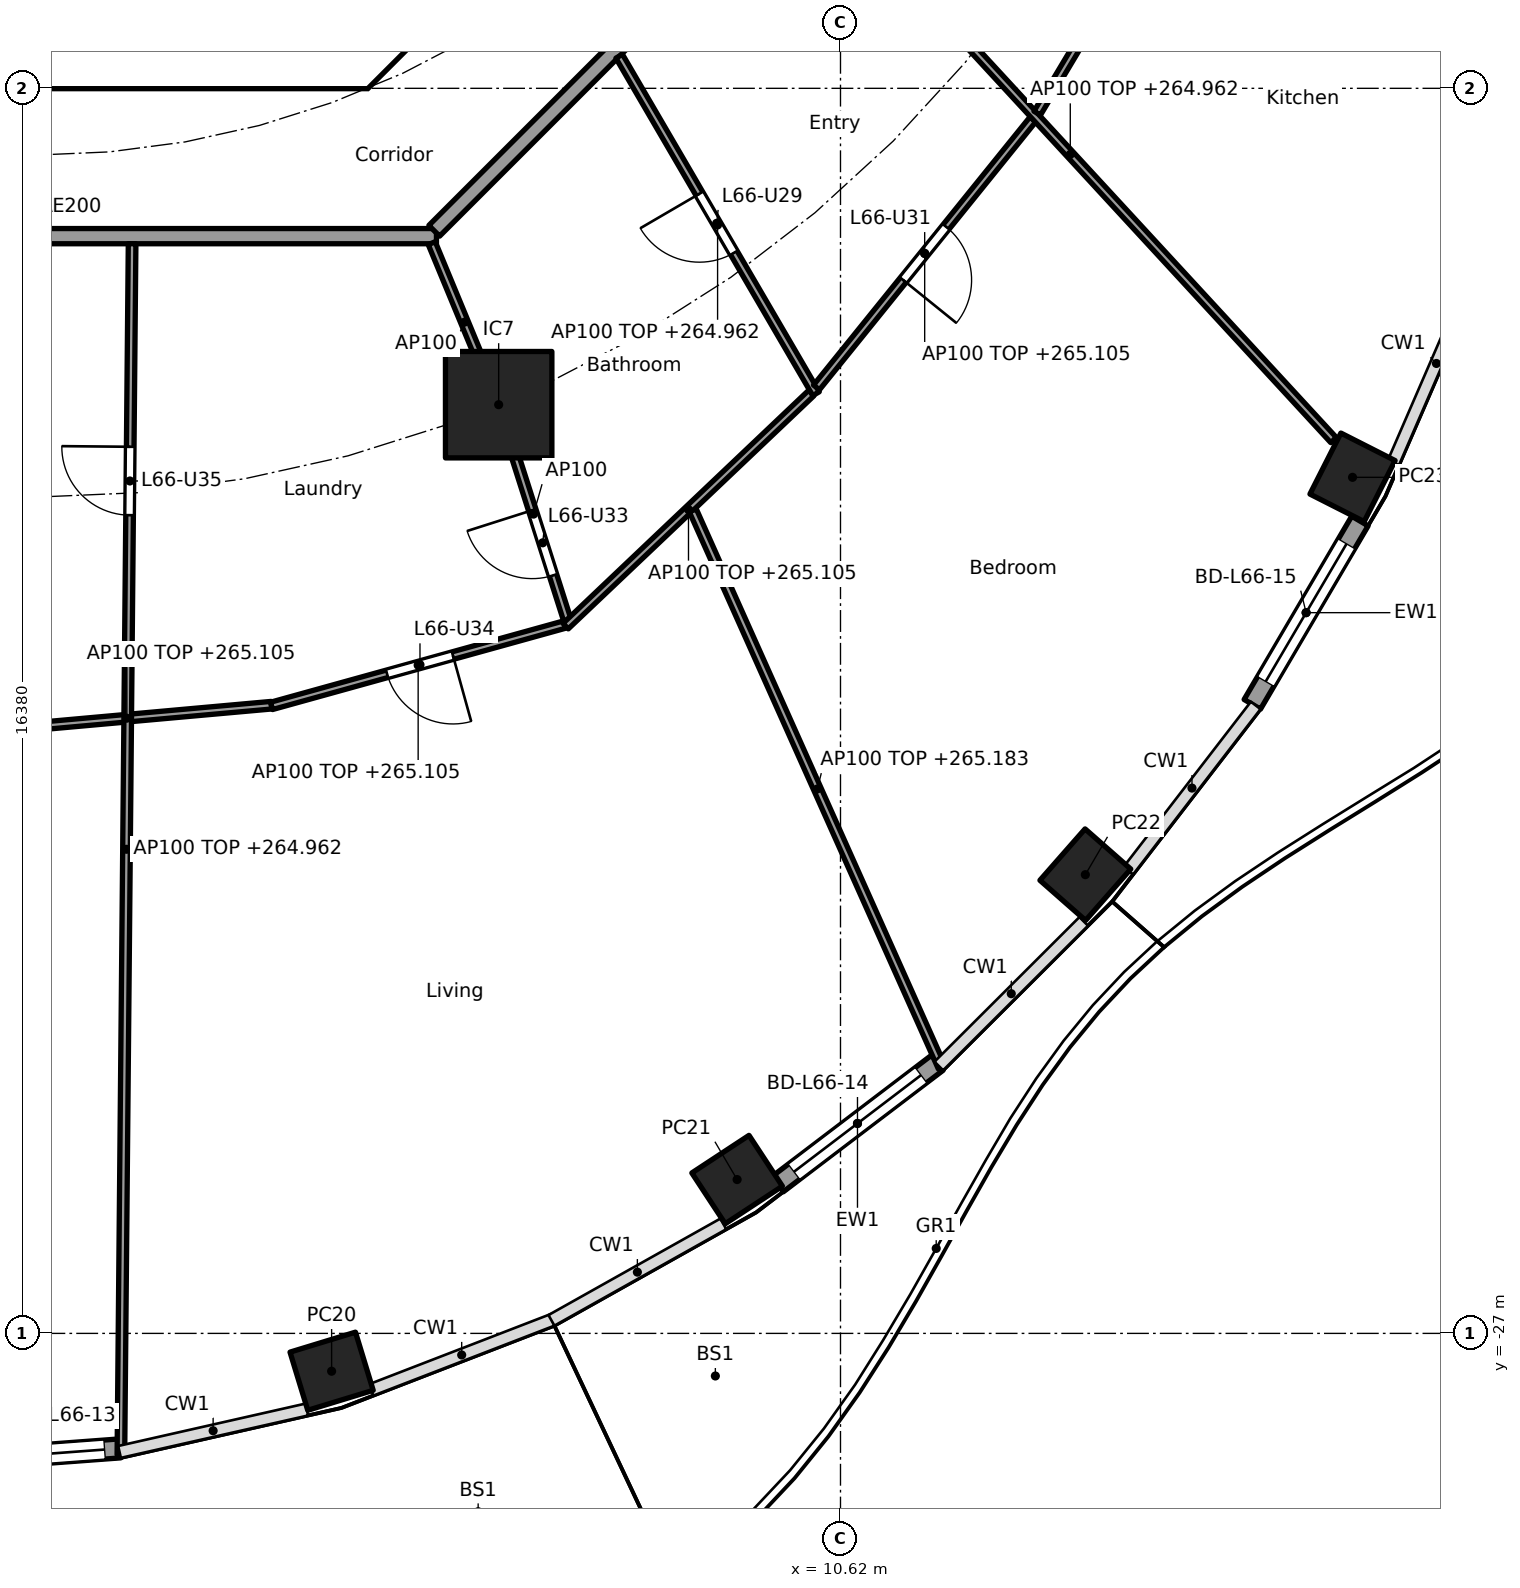
"""IFC4 building model, lengths in metres.
Left out: names, types, materials, properties, quantities, classifications, styles, units other than length and angle.
Written with IfcOpenShell. Run it as: python <this file> out.ifc"""

import sys

from ifc_helpers import new_model, si_unit, direction, frame, frame_2d, origin, origin_2d, place, context, subcontext, project, spatial, polyline, rectangle, hollow_rectangle, outline, extrude, element, fill, save


model = new_model("IFC4")
c1 = context("Model", 3, precision=1e-05, world=origin(), true_north=direction((0.0, 1.0)))
c2 = subcontext(c1, "Body", "Model", "MODEL_VIEW")
j1 = project(units=[si_unit("LENGTHUNIT", "METRE"), si_unit("PLANEANGLEUNIT", "RADIAN")], contexts=[c1])
p1 = place(None, origin())
s1 = spatial("IfcSite", under=j1, at=p1, CompositionType="ELEMENT")
p2 = place(p1, origin())
s2 = spatial("IfcBuilding", under=s1, at=p2, CompositionType="ELEMENT")
p3 = place(p2, frame((0.0, 0.0, 262.2)))
s3 = spatial("IfcBuildingStorey", under=s2, at=p3, CompositionType="ELEMENT", Elevation=262.2)
for number, where, z_axis, x_axis in (
    (1, (3.925, -27.498, 0.0), (0.0, 0.0, 1.0), (0.957, 0.292, 0.0)),
    (2, (9.26, -24.976, 0.0), (0.0, 0.0, 1.0), (0.836, 0.549, 0.0)),
    (3, (13.841, -20.965, 0.0), (0.0, 0.0, 1.0), (0.66, 0.751, 0.0)),
    (4, (17.356, -15.738, 0.0), (0.0, 0.0, 1.0), (0.452, 0.892, 0.0)),
):
    element("IfcColumn", number, at=place(p3, frame(where, z_axis=z_axis, x_axis=x_axis)), inside=s3, PredefinedType="COLUMN", context=c2, shape_type="SweptSolid", body=[
        extrude(hollow_rectangle(XDim=0.9, YDim=0.8, WallThickness=0.028, at=origin_2d()), origin(), (0.0, 0.0, 1.0), 3.7),
    ])
p4 = place(p3, frame((6.123, -14.782, 0.0), z_axis=(0.0, 0.0, 1.0), x_axis=(1.0, 0.0, 0.0)))
e5 = element("IfcColumn", 5, at=p4, inside=s3, PredefinedType="COLUMN", context=c2, shape_type="SweptSolid", body=[
    extrude(rectangle(XDim=1.4, YDim=1.4, at=origin_2d()), origin(), (0.0, 0.0, 1.0), 3.7),
])
p5 = place(p3, frame((1.143, -28.513, 0.0), z_axis=(0.0, 0.0, 1.0), x_axis=(-0.997236892469, -0.074287147606, 0.0)))
e6 = element("IfcWall", 6, at=p5, inside=s3, PredefinedType="SOLIDWALL", context=c2, shape_type="SweptSolid", body=[
    extrude(rectangle(XDim=2.511, YDim=0.25, at=frame_2d((1.255, 0.0))), origin(), (0.0, 0.0, 1.0), 3.44),
])
p6 = place(p5, frame((0.205, 0.0, 0.0)))
e7 = element("IfcOpeningElement", 7, at=p6, cuts=e6, PredefinedType="OPENING", context=c2, shape_type="SweptSolid", body=[
    extrude(rectangle(XDim=2.1, YDim=2.4, at=frame_2d((1.05, 1.2))), frame((0.0, 0.135, 0.0), z_axis=(0.0, -1.0, 0.0), x_axis=(1.0, 0.0, 0.0)), (0.0, 0.0, 1.0), 0.27),
])
p7 = place(p3, frame((11.895, -23.439, 0.0), z_axis=(0.0, 0.0, 1.0), x_axis=(-0.796055284084, -0.605223912847, 0.0)))
e8 = element("IfcWall", 8, at=p7, inside=s3, PredefinedType="SOLIDWALL", context=c2, shape_type="SweptSolid", body=[
    extrude(rectangle(XDim=2.641, YDim=0.25, at=frame_2d((1.32, 0.0))), origin(), (0.0, 0.0, 1.0), 3.44),
])
p8 = place(p7, frame((0.27, 0.0, 0.0)))
e9 = element("IfcOpeningElement", 9, at=p8, cuts=e8, PredefinedType="OPENING", context=c2, shape_type="SweptSolid", body=[
    extrude(rectangle(XDim=2.1, YDim=2.4, at=frame_2d((1.05, 1.2))), frame((0.0, 0.135, 0.0), z_axis=(0.0, -1.0, 0.0), x_axis=(1.0, 0.0, 0.0)), (0.0, 0.0, 1.0), 0.27),
])
p9 = place(p3, frame((17.454, -16.312, 0.0), z_axis=(0.0, 0.0, 1.0), x_axis=(-0.506371364425, -0.862315511452, 0.0)))
e10 = element("IfcWall", 10, at=p9, inside=s3, PredefinedType="SOLIDWALL", context=c2, shape_type="SweptSolid", body=[
    extrude(rectangle(XDim=2.796, YDim=0.25, at=frame_2d((1.398, 0.0))), origin(), (0.0, 0.0, 1.0), 3.44),
])
p10 = place(p9, frame((0.348, 0.0, 0.0)))
e11 = element("IfcOpeningElement", 11, at=p10, cuts=e10, PredefinedType="OPENING", context=c2, shape_type="SweptSolid", body=[
    extrude(rectangle(XDim=2.1, YDim=2.4, at=frame_2d((1.05, 1.2))), frame((0.0, 0.135, 0.0), z_axis=(0.0, -1.0, 0.0), x_axis=(1.0, 0.0, 0.0)), (0.0, 0.0, 1.0), 0.27),
])
p11 = place(p3, frame((4.613, -9.988, 0.0), z_axis=(0.0, 0.0, 1.0), x_axis=(0.707106781187, 0.707106781187, 0.0)))
e12 = element("IfcWall", 12, at=p11, inside=s3, PredefinedType="SHEAR", context=c2, shape_type="SweptSolid", body=[
    extrude(rectangle(XDim=7.602, YDim=0.6, at=frame_2d((3.801, 0.0))), origin(), (0.0, 0.0, 1.0), 3.44),
])
p12 = place(p11, frame((3.201, 0.0, 0.0)))
e13 = element("IfcOpeningElement", 13, at=p12, cuts=e12, PredefinedType="OPENING", context=c2, shape_type="SweptSolid", body=[
    extrude(rectangle(XDim=1.2, YDim=2.1, at=frame_2d((0.6, 1.05))), frame((0.0, 0.31, 0.0), z_axis=(0.0, -1.0, 0.0), x_axis=(1.0, 0.0, 0.0)), (0.0, 0.0, 1.0), 0.62),
])
p13 = place(p3, origin())
e14 = element("IfcWall", 14, at=p13, inside=s3, PredefinedType="SHEAR", context=c2, shape_type="SweptSolid", body=[
    extrude(outline(polyline([(-4.152, -10.025), (4.152, -10.025), (4.401, -9.776), (4.825, -10.2), (4.401, -10.625), (-4.401, -10.625), (-4.825, -10.2), (-4.401, -9.776), (-4.152, -10.025)])), origin(), (0.0, 0.0, 1.0), 3.44),
])
p14 = place(p3, frame((-5.104, -12.565, 0.0), z_axis=(0.0, 0.0, 1.0), x_axis=(1.0, 0.0, 0.0)))
e15 = element("IfcWall", 15, at=p14, inside=s3, PredefinedType="PARTITIONING", context=c2, shape_type="SweptSolid", body=[
    extrude(rectangle(XDim=10.409, YDim=0.2, at=frame_2d((5.205, 0.0))), origin(), (0.0, 0.0, 1.0), 3.44),
])
p15 = place(p3, frame((5.275, -12.494, 0.0), z_axis=(0.0, 0.0, 1.0), x_axis=(0.707106781187, 0.707106781187, 0.0)))
e16 = element("IfcWall", 16, at=p15, inside=s3, PredefinedType="PARTITIONING", context=c2, shape_type="SweptSolid", body=[
    extrude(rectangle(XDim=10.409, YDim=0.2, at=frame_2d((5.205, 0.0))), origin(), (0.0, 0.0, 1.0), 3.44),
])
p16 = place(p15, frame((4.604, 0.0, 0.0)))
e17 = element("IfcOpeningElement", 17, at=p16, cuts=e16, PredefinedType="OPENING", context=c2, shape_type="SweptSolid", body=[
    extrude(rectangle(XDim=1.0, YDim=2.1, at=frame_2d((0.5, 1.05))), frame((0.0, 0.11, 0.0), z_axis=(0.0, -1.0, 0.0), x_axis=(1.0, 0.0, 0.0)), (0.0, 0.0, 1.0), 0.22),
])
p17 = place(p3, frame((-0.67, -19.077, 0.0), z_axis=(0.0, 0.0, 1.0), x_axis=(0.995986472869, 0.089503887414, 0.0)))
e18 = element("IfcWall", 18, at=p17, inside=s3, PredefinedType="PARTITIONING", context=c2, shape_type="SweptSolid", body=[
    extrude(rectangle(XDim=3.819, YDim=0.1, at=frame_2d((1.909, 0.0))), origin(), (0.0, 0.0, 1.0), 2.905),
])
p18 = place(p3, frame((1.3, -12.665, 0.0), z_axis=(0.0, 0.0, 1.0), x_axis=(-0.009254890166, -0.999957172587, 0.0)))
e19 = element("IfcWall", 19, at=p18, inside=s3, PredefinedType="PARTITIONING", context=c2, shape_type="SweptSolid", body=[
    extrude(rectangle(XDim=15.933, YDim=0.1, at=frame_2d((7.967, 0.0))), origin(), (0.0, 0.0, 1.0), 2.762),
])
p19 = place(p18, frame((2.671, 0.0, 0.0)))
e20 = element("IfcOpeningElement", 20, at=p19, cuts=e19, PredefinedType="OPENING", context=c2, shape_type="SweptSolid", body=[
    extrude(rectangle(XDim=0.9, YDim=2.1, at=frame_2d((0.45, 1.05))), frame((0.0, 0.06, 0.0), z_axis=(0.0, -1.0, 0.0), x_axis=(1.0, 0.0, 0.0)), (0.0, 0.0, 1.0), 0.12),
])
p20 = place(p3, frame((3.135, -18.744, 0.0), z_axis=(0.0, 0.0, 1.0), x_axis=(0.963606111552, 0.267326133738, 0.0)))
e21 = element("IfcWall", 21, at=p20, inside=s3, PredefinedType="PARTITIONING", context=c2, shape_type="SweptSolid", body=[
    extrude(rectangle(XDim=4.003, YDim=0.1, at=frame_2d((2.001, 0.0))), origin(), (0.0, 0.0, 1.0), 2.905),
])
p21 = place(p20, frame((1.576, 0.0, 0.0)))
e22 = element("IfcOpeningElement", 22, at=p21, cuts=e21, PredefinedType="OPENING", context=c2, shape_type="SweptSolid", body=[
    extrude(rectangle(XDim=0.9, YDim=2.1, at=frame_2d((0.45, 1.05))), frame((0.0, 0.06, 0.0), z_axis=(0.0, -1.0, 0.0), x_axis=(1.0, 0.0, 0.0)), (0.0, 0.0, 1.0), 0.12),
])
p22 = place(p3, frame((5.243, -12.657, 0.0), z_axis=(0.0, 0.0, 1.0), x_axis=(0.382719158442, -0.923864733477, 0.0)))
e23 = element("IfcWall", 23, at=p22, inside=s3, PredefinedType="PARTITIONING", context=c2, shape_type="SweptSolid", body=[
    extrude(rectangle(XDim=2.25, YDim=0.1, at=frame_2d((1.125, 0.0))), origin(), (0.0, 0.0, 1.0), 3.44),
])
p23 = place(p3, frame((6.138, -14.83, 0.0), z_axis=(0.0, 0.0, 1.0), x_axis=(0.303665801704, -0.952778610631, 0.0)))
e24 = element("IfcWall", 24, at=p23, inside=s3, PredefinedType="PARTITIONING", context=c2, shape_type="SweptSolid", body=[
    extrude(rectangle(XDim=2.922, YDim=0.1, at=frame_2d((1.461, 0.0))), origin(), (0.0, 0.0, 1.0), 3.44),
])
p24 = place(p23, frame((1.407, 0.0, 0.0)))
e25 = element("IfcOpeningElement", 25, at=p24, cuts=e24, PredefinedType="OPENING", context=c2, shape_type="SweptSolid", body=[
    extrude(rectangle(XDim=0.9, YDim=2.1, at=frame_2d((0.45, 1.05))), frame((0.0, 0.06, 0.0), z_axis=(0.0, -1.0, 0.0), x_axis=(1.0, 0.0, 0.0)), (0.0, 0.0, 1.0), 0.12),
])
p25 = place(p3, frame((7.004, -17.695, 0.0), z_axis=(0.0, 0.0, 1.0), x_axis=(0.725438442765, 0.68828705186, 0.0)))
e26 = element("IfcWall", 26, at=p25, inside=s3, PredefinedType="PARTITIONING", context=c2, shape_type="SweptSolid", body=[
    extrude(rectangle(XDim=4.456, YDim=0.1, at=frame_2d((2.228, 0.0))), origin(), (0.0, 0.0, 1.0), 2.905),
])
p26 = place(p3, frame((8.677, -16.173, 0.0), z_axis=(0.0, 0.0, 1.0), x_axis=(0.408174671437, -0.912903849043, 0.0)))
e27 = element("IfcWall", 27, at=p26, inside=s3, PredefinedType="PARTITIONING", context=c2, shape_type="SweptSolid", body=[
    extrude(rectangle(XDim=8.028, YDim=0.1, at=frame_2d((4.014, 0.0))), origin(), (0.0, 0.0, 1.0), 2.983),
])
p27 = place(p3, frame((7.708, -10.198, 0.0), z_axis=(0.0, 0.0, 1.0), x_axis=(0.503838537732, -0.863797851292, 0.0)))
e28 = element("IfcWall", 28, at=p27, inside=s3, PredefinedType="PARTITIONING", context=c2, shape_type="SweptSolid", body=[
    extrude(rectangle(XDim=5.14, YDim=0.1, at=frame_2d((2.57, 0.0))), origin(), (0.0, 0.0, 1.0), 2.762),
])
p28 = place(p27, frame((2.095, 0.0, 0.0)))
e29 = element("IfcOpeningElement", 29, at=p28, cuts=e28, PredefinedType="OPENING", context=c2, shape_type="SweptSolid", body=[
    extrude(rectangle(XDim=0.9, YDim=2.1, at=frame_2d((0.45, 1.05))), frame((0.0, 0.06, 0.0), z_axis=(0.0, -1.0, 0.0), x_axis=(1.0, 0.0, 0.0)), (0.0, 0.0, 1.0), 0.12),
])
p29 = place(p3, frame((10.304, -14.555, 0.0), z_axis=(0.0, 0.0, 1.0), x_axis=(0.628170338674, 0.778075848237, 0.0)))
e30 = element("IfcWall", 30, at=p29, inside=s3, PredefinedType="PARTITIONING", context=c2, shape_type="SweptSolid", body=[
    extrude(rectangle(XDim=4.532, YDim=0.1, at=frame_2d((2.266, 0.0))), origin(), (0.0, 0.0, 1.0), 2.905),
])
p30 = place(p29, frame((1.816, 0.0, 0.0)))
e31 = element("IfcOpeningElement", 31, at=p30, cuts=e30, PredefinedType="OPENING", context=c2, shape_type="SweptSolid", body=[
    extrude(rectangle(XDim=0.9, YDim=2.1, at=frame_2d((0.45, 1.05))), frame((0.0, 0.06, 0.0), z_axis=(0.0, -1.0, 0.0), x_axis=(1.0, 0.0, 0.0)), (0.0, 0.0, 1.0), 0.12),
])
p31 = place(p3, frame((10.179, -7.731, 0.0), z_axis=(0.0, 0.0, 1.0), x_axis=(0.67775318564, -0.73528947997, 0.0)))
e32 = element("IfcWall", 32, at=p31, inside=s3, PredefinedType="PARTITIONING", context=c2, shape_type="SweptSolid", body=[
    extrude(rectangle(XDim=10.222, YDim=0.1, at=frame_2d((5.111, 0.0))), origin(), (0.0, 0.0, 1.0), 2.762),
])
p32 = place(p31, frame((1.766, 0.0, 0.0)))
e33 = element("IfcOpeningElement", 33, at=p32, cuts=e32, PredefinedType="OPENING", context=c2, shape_type="SweptSolid", body=[
    extrude(rectangle(XDim=0.9, YDim=2.1, at=frame_2d((0.45, 1.05))), frame((0.0, 0.06, 0.0), z_axis=(0.0, -1.0, 0.0), x_axis=(1.0, 0.0, 0.0)), (0.0, 0.0, 1.0), 0.12),
])
p33 = place(p3, frame((13.208, -10.947, 0.0), z_axis=(0.0, 0.0, 1.0), x_axis=(0.512726452516, 0.858552028063, 0.0)))
e34 = element("IfcWall", 34, at=p33, inside=s3, PredefinedType="PARTITIONING", context=c2, shape_type="SweptSolid", body=[
    extrude(rectangle(XDim=4.772, YDim=0.1, at=frame_2d((2.386, 0.0))), origin(), (0.0, 0.0, 1.0), 2.905),
])
p34 = place(p33, frame((1.936, 0.0, 0.0)))
e35 = element("IfcOpeningElement", 35, at=p34, cuts=e34, PredefinedType="OPENING", context=c2, shape_type="SweptSolid", body=[
    extrude(rectangle(XDim=0.9, YDim=2.1, at=frame_2d((0.45, 1.05))), frame((0.0, 0.06, 0.0), z_axis=(0.0, -1.0, 0.0), x_axis=(1.0, 0.0, 0.0)), (0.0, 0.0, 1.0), 0.12),
])
p35 = place(p6, origin())
e36 = element("IfcDoor", 36, at=p35, inside=s3, OperationType="SLIDING_TO_LEFT", PredefinedType="DOOR", context=c2, shape_type="SweptSolid", body=[
    extrude(rectangle(XDim=2.1, YDim=2.4, at=frame_2d((1.05, 1.2))), frame((0.0, 0.025, 0.0), z_axis=(0.0, -1.0, 0.0), x_axis=(1.0, 0.0, 0.0)), (0.0, 0.0, 1.0), 0.05),
])
fill(e7, e36)
p36 = place(p8, origin())
e37 = element("IfcDoor", 37, at=p36, inside=s3, OperationType="SLIDING_TO_LEFT", PredefinedType="DOOR", context=c2, shape_type="SweptSolid", body=[
    extrude(rectangle(XDim=2.1, YDim=2.4, at=frame_2d((1.05, 1.2))), frame((0.0, 0.025, 0.0), z_axis=(0.0, -1.0, 0.0), x_axis=(1.0, 0.0, 0.0)), (0.0, 0.0, 1.0), 0.05),
])
fill(e9, e37)
p37 = place(p10, origin())
e38 = element("IfcDoor", 38, at=p37, inside=s3, OperationType="SLIDING_TO_LEFT", PredefinedType="DOOR", context=c2, shape_type="SweptSolid", body=[
    extrude(rectangle(XDim=2.1, YDim=2.4, at=frame_2d((1.05, 1.2))), frame((0.0, 0.025, 0.0), z_axis=(0.0, -1.0, 0.0), x_axis=(1.0, 0.0, 0.0)), (0.0, 0.0, 1.0), 0.05),
])
fill(e11, e38)
p38 = place(p28, frame((0.9, 0.0, 0.0), x_axis=(-1.0, 0.0, 0.0)))
e39 = element("IfcDoor", 39, at=p38, inside=s3, OperationType="SINGLE_SWING_RIGHT", PredefinedType="DOOR", context=c2, shape_type="SweptSolid", body=[
    extrude(rectangle(XDim=0.9, YDim=2.1, at=frame_2d((0.45, 1.05))), frame((0.0, 0.025, 0.0), z_axis=(0.0, -1.0, 0.0), x_axis=(1.0, 0.0, 0.0)), (0.0, 0.0, 1.0), 0.05),
])
fill(e29, e39)
p39 = place(p30, frame((0.9, 0.0, 0.0), x_axis=(-1.0, 0.0, 0.0)))
e40 = element("IfcDoor", 40, at=p39, inside=s3, OperationType="SINGLE_SWING_RIGHT", PredefinedType="DOOR", context=c2, shape_type="SweptSolid", body=[
    extrude(rectangle(XDim=0.9, YDim=2.1, at=frame_2d((0.45, 1.05))), frame((0.0, 0.025, 0.0), z_axis=(0.0, -1.0, 0.0), x_axis=(1.0, 0.0, 0.0)), (0.0, 0.0, 1.0), 0.05),
])
fill(e31, e40)
p40 = place(p24, frame((0.9, 0.0, 0.0), x_axis=(-1.0, 0.0, 0.0)))
e41 = element("IfcDoor", 41, at=p40, inside=s3, OperationType="SINGLE_SWING_RIGHT", PredefinedType="DOOR", context=c2, shape_type="SweptSolid", body=[
    extrude(rectangle(XDim=0.9, YDim=2.1, at=frame_2d((0.45, 1.05))), frame((0.0, 0.025, 0.0), z_axis=(0.0, -1.0, 0.0), x_axis=(1.0, 0.0, 0.0)), (0.0, 0.0, 1.0), 0.05),
])
fill(e25, e41)
p41 = place(p21, frame((0.9, 0.0, 0.0), x_axis=(-1.0, 0.0, 0.0)))
e42 = element("IfcDoor", 42, at=p41, inside=s3, OperationType="SINGLE_SWING_LEFT", PredefinedType="DOOR", context=c2, shape_type="SweptSolid", body=[
    extrude(rectangle(XDim=0.9, YDim=2.1, at=frame_2d((0.45, 1.05))), frame((0.0, 0.025, 0.0), z_axis=(0.0, -1.0, 0.0), x_axis=(1.0, 0.0, 0.0)), (0.0, 0.0, 1.0), 0.05),
])
fill(e22, e42)
p42 = place(p19, frame((0.9, 0.0, 0.0), x_axis=(-1.0, 0.0, 0.0)))
e43 = element("IfcDoor", 43, at=p42, inside=s3, OperationType="SINGLE_SWING_RIGHT", PredefinedType="DOOR", context=c2, shape_type="SweptSolid", body=[
    extrude(rectangle(XDim=0.9, YDim=2.1, at=frame_2d((0.45, 1.05))), frame((0.0, 0.025, 0.0), z_axis=(0.0, -1.0, 0.0), x_axis=(1.0, 0.0, 0.0)), (0.0, 0.0, 1.0), 0.05),
])
fill(e20, e43)
save(model, sys.argv[1])
